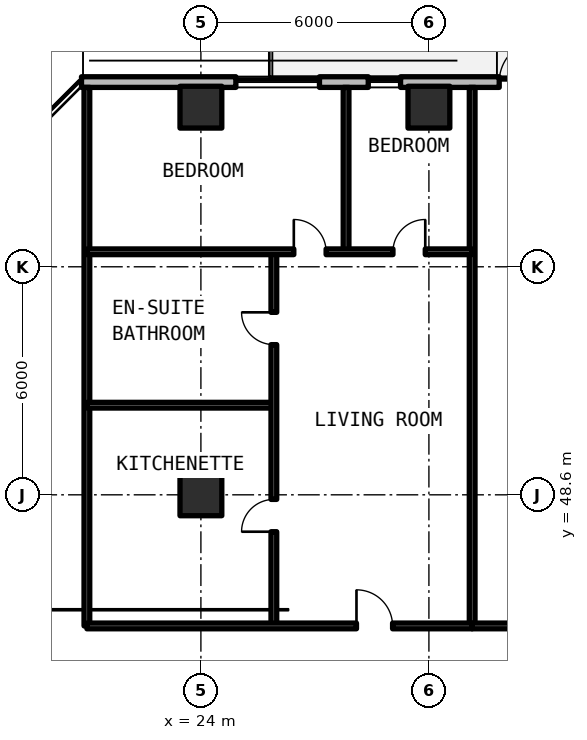
"""IFC4 building model, lengths in metres.
Left out: names, types, materials, properties, quantities, classifications, styles, units other than length and angle.
Written with IfcOpenShell. Run it as: python <this file> out.ifc"""

import sys

from ifc_helpers import new_model, si_unit, direction, frame, frame_2d, origin, origin_2d, place, context, subcontext, project, spatial, rectangle, extrude, element, fill, save


model = new_model("IFC4")
c1 = context("Model", 3, precision=1e-05, world=origin(), true_north=direction((0.0, 1.0)))
c2 = subcontext(c1, "Body", "Model", "MODEL_VIEW")
j1 = project(units=[si_unit("LENGTHUNIT", "METRE"), si_unit("PLANEANGLEUNIT", "RADIAN")], contexts=[c1])
p1 = place(None, origin())
s1 = spatial("IfcSite", under=j1, at=p1, CompositionType="ELEMENT")
p2 = place(p1, origin())
s2 = spatial("IfcBuilding", under=s1, at=p2, CompositionType="ELEMENT")
p3 = place(p2, frame((0.0, 0.0, 55.44)))
s3 = spatial("IfcBuildingStorey", under=s2, at=p3, CompositionType="ELEMENT", Elevation=55.44)
for number, where, z_axis, x_axis in (
    (1, (24.0, 48.6, 0.0), (0.0, 0.0, 1.0), (1.0, 0.0, 0.0)),
    (2, (24.0, 58.8, 0.0), (0.0, 0.0, 1.0), (1.0, 0.0, 0.0)),
    (3, (30.0, 58.8, 0.0), (0.0, 0.0, 1.0), (1.0, 0.0, 0.0)),
):
    element("IfcColumn", number, at=place(p3, frame(where, z_axis=z_axis, x_axis=x_axis)), inside=s3, PredefinedType="COLUMN", context=c2, shape_type="SweptSolid", body=[
        extrude(rectangle(XDim=1.1, YDim=1.1, at=origin_2d()), origin(), (0.0, 0.0, 1.0), 3.3),
    ])
p4 = place(p3, frame((43.46, 59.46, 0.0), z_axis=(0.0, 0.0, 1.0), x_axis=(-1.0, 0.0, 0.0)))
e4 = element("IfcWall", 4, at=p4, inside=s3, PredefinedType="SOLIDWALL", context=c2, shape_type="SweptSolid", body=[
    extrude(rectangle(XDim=22.602, YDim=0.28, at=frame_2d((11.301, 0.0))), origin(), (0.0, 0.0, 1.0), 3.08),
])
p5 = place(p4, frame((10.51, 0.0, 0.0)))
e5 = element("IfcOpeningElement", 5, at=p5, cuts=e4, PredefinedType="OPENING", context=c2, shape_type="SweptSolid", body=[
    extrude(rectangle(XDim=1.1, YDim=2.15, at=frame_2d((0.55, 1.075))), frame((0.0, 0.15, 0.0), z_axis=(0.0, -1.0, 0.0), x_axis=(1.0, 0.0, 0.0)), (0.0, 0.0, 1.0), 0.3),
])
p6 = place(p4, frame((16.34, 0.0, 0.78)))
e6 = element("IfcOpeningElement", 6, at=p6, cuts=e4, PredefinedType="OPENING", context=c2, shape_type="SweptSolid", body=[
    extrude(rectangle(XDim=2.2, YDim=1.66, at=frame_2d((1.1, 0.83))), frame((0.0, 0.15, 0.0), z_axis=(0.0, -1.0, 0.0), x_axis=(1.0, 0.0, 0.0)), (0.0, 0.0, 1.0), 0.3),
])
p7 = place(p4, frame((14.206, 0.0, 0.78)))
e7 = element("IfcOpeningElement", 7, at=p7, cuts=e4, PredefinedType="OPENING", context=c2, shape_type="SweptSolid", body=[
    extrude(rectangle(XDim=0.85, YDim=1.65, at=frame_2d((0.425, 0.825))), frame((0.0, 0.15, 0.0), z_axis=(0.0, -1.0, 0.0), x_axis=(1.0, 0.0, 0.0)), (0.0, 0.0, 1.0), 0.3),
])
for number, where, z_axis, x_axis in (
    (8, (21.0, 45.15, 0.0), (0.0, 0.0, 1.0), (0.0, 1.0, 0.0)),
    (9, (31.138, 45.15, 0.0), (0.0, 0.0, 1.0), (0.0, 1.0, 0.0)),
):
    element("IfcWall", number, at=place(p3, frame(where, z_axis=z_axis, x_axis=x_axis)), inside=s3, PredefinedType="SOLIDWALL", context=c2, shape_type="SweptSolid", body=[
        extrude(rectangle(XDim=14.17, YDim=0.15, at=frame_2d((7.085, 0.0))), origin(), (0.0, 0.0, 1.0), 2.35),
    ])
p8 = place(p3, frame((21.0, 50.958, 0.0), z_axis=(0.0, 0.0, 1.0), x_axis=(1.0, 0.0, 0.0)))
e10 = element("IfcWall", 10, at=p8, inside=s3, PredefinedType="PARTITIONING", context=c2, shape_type="SweptSolid", body=[
    extrude(rectangle(XDim=4.92, YDim=0.15, at=frame_2d((2.46, 0.0))), origin(), (0.0, 0.0, 1.0), 2.35),
])
p9 = place(p3, frame((25.92, 45.15, 0.0), z_axis=(0.0, 0.0, 1.0), x_axis=(0.0, 1.0, 0.0)))
e11 = element("IfcWall", 11, at=p9, inside=s3, PredefinedType="PARTITIONING", context=c2, shape_type="SweptSolid", body=[
    extrude(rectangle(XDim=9.844, YDim=0.15, at=frame_2d((4.922, 0.0))), origin(), (0.0, 0.0, 1.0), 2.35),
])
p10 = place(p9, frame((2.479, 0.0, 0.0)))
e12 = element("IfcOpeningElement", 12, at=p10, cuts=e11, PredefinedType="OPENING", context=c2, shape_type="SweptSolid", body=[
    extrude(rectangle(XDim=0.85, YDim=2.1, at=frame_2d((0.425, 1.05))), frame((0.0, 0.085, 0.0), z_axis=(0.0, -1.0, 0.0), x_axis=(1.0, 0.0, 0.0)), (0.0, 0.0, 1.0), 0.17),
])
p11 = place(p9, frame((7.401, 0.0, 0.0)))
e13 = element("IfcOpeningElement", 13, at=p11, cuts=e11, PredefinedType="OPENING", context=c2, shape_type="SweptSolid", body=[
    extrude(rectangle(XDim=0.85, YDim=2.1, at=frame_2d((0.425, 1.05))), frame((0.0, 0.085, 0.0), z_axis=(0.0, -1.0, 0.0), x_axis=(1.0, 0.0, 0.0)), (0.0, 0.0, 1.0), 0.17),
])
p12 = place(p3, frame((27.82, 54.994, 0.0), z_axis=(0.0, 0.0, 1.0), x_axis=(0.0, 1.0, 0.0)))
e14 = element("IfcWall", 14, at=p12, inside=s3, PredefinedType="PARTITIONING", context=c2, shape_type="SweptSolid", body=[
    extrude(rectangle(XDim=4.326, YDim=0.15, at=frame_2d((2.163, 0.0))), origin(), (0.0, 0.0, 1.0), 2.35),
])
p13 = place(p3, frame((21.0, 54.994, 0.0), z_axis=(0.0, 0.0, 1.0), x_axis=(1.0, 0.0, 0.0)))
e15 = element("IfcWall", 15, at=p13, inside=s3, PredefinedType="PARTITIONING", context=c2, shape_type="SweptSolid", body=[
    extrude(rectangle(XDim=10.138, YDim=0.15, at=frame_2d((5.069, 0.0))), origin(), (0.0, 0.0, 1.0), 2.35),
])
p14 = place(p13, frame((5.445, 0.0, 0.0)))
e16 = element("IfcOpeningElement", 16, at=p14, cuts=e15, PredefinedType="OPENING", context=c2, shape_type="SweptSolid", body=[
    extrude(rectangle(XDim=0.85, YDim=2.1, at=frame_2d((0.425, 1.05))), frame((0.0, 0.085, 0.0), z_axis=(0.0, -1.0, 0.0), x_axis=(1.0, 0.0, 0.0)), (0.0, 0.0, 1.0), 0.17),
])
p15 = place(p13, frame((8.054, 0.0, 0.0)))
e17 = element("IfcOpeningElement", 17, at=p15, cuts=e15, PredefinedType="OPENING", context=c2, shape_type="SweptSolid", body=[
    extrude(rectangle(XDim=0.85, YDim=2.1, at=frame_2d((0.425, 1.05))), frame((0.0, 0.085, 0.0), z_axis=(0.0, -1.0, 0.0), x_axis=(1.0, 0.0, 0.0)), (0.0, 0.0, 1.0), 0.17),
])
p16 = place(p3, frame((21.0, 45.15, 0.0), z_axis=(0.0, 0.0, 1.0), x_axis=(1.0, 0.0, 0.0)))
e18 = element("IfcWall", 18, at=p16, inside=s3, PredefinedType="SOLIDWALL", context=c2, shape_type="SweptSolid", body=[
    extrude(rectangle(XDim=10.138, YDim=0.15, at=frame_2d((5.069, 0.0))), origin(), (0.0, 0.0, 1.0), 2.35),
])
p17 = place(p16, frame((7.094, 0.0, 0.0)))
e19 = element("IfcOpeningElement", 19, at=p17, cuts=e18, PredefinedType="OPENING", context=c2, shape_type="SweptSolid", body=[
    extrude(rectangle(XDim=0.95, YDim=2.15, at=frame_2d((0.475, 1.075))), frame((0.0, 0.085, 0.0), z_axis=(0.0, -1.0, 0.0), x_axis=(1.0, 0.0, 0.0)), (0.0, 0.0, 1.0), 0.17),
])
p18 = place(p3, frame((31.138, 45.15, 0.0), z_axis=(0.0, 0.0, 1.0), x_axis=(1.0, 0.0, 0.0)))
e20 = element("IfcWall", 20, at=p18, inside=s3, PredefinedType="SOLIDWALL", context=c2, shape_type="SweptSolid", body=[
    extrude(rectangle(XDim=12.342, YDim=0.15, at=frame_2d((6.171, 0.0))), origin(), (0.0, 0.0, 1.0), 2.35),
])
p19 = place(p18, frame((5.621, 0.0, 0.0)))
e21 = element("IfcOpeningElement", 21, at=p19, cuts=e20, PredefinedType="OPENING", context=c2, shape_type="SweptSolid", body=[
    extrude(rectangle(XDim=1.1, YDim=2.15, at=frame_2d((0.55, 1.075))), frame((0.0, 0.085, 0.0), z_axis=(0.0, -1.0, 0.0), x_axis=(1.0, 0.0, 0.0)), (0.0, 0.0, 1.0), 0.17),
])
p20 = place(p5, frame((1.1, 0.0, 0.0), z_axis=(0.0, 0.0, 1.0), x_axis=(-1.0, 0.0, 0.0)))
e22 = element("IfcDoor", 22, at=p20, inside=s3, OperationType="SINGLE_SWING_LEFT", PredefinedType="DOOR", context=c2, shape_type="SweptSolid", body=[
    extrude(rectangle(XDim=1.1, YDim=2.15, at=frame_2d((0.55, 1.075))), frame((0.0, 0.025, 0.0), z_axis=(0.0, -1.0, 0.0), x_axis=(1.0, 0.0, 0.0)), (0.0, 0.0, 1.0), 0.05),
])
fill(e5, e22)
p21 = place(p6, origin())
e23 = element("IfcWindow", 23, at=p21, inside=s3, PartitioningType="SINGLE_PANEL", PredefinedType="WINDOW", context=c2, shape_type="SweptSolid", body=[
    extrude(rectangle(XDim=2.2, YDim=1.66, at=frame_2d((1.1, 0.83))), frame((0.0, 0.03, 0.0), z_axis=(0.0, -1.0, 0.0), x_axis=(1.0, 0.0, 0.0)), (0.0, 0.0, 1.0), 0.06),
])
fill(e6, e23)
p22 = place(p7, origin())
e24 = element("IfcWindow", 24, at=p22, inside=s3, PartitioningType="SINGLE_PANEL", PredefinedType="WINDOW", context=c2, shape_type="SweptSolid", body=[
    extrude(rectangle(XDim=0.85, YDim=1.65, at=frame_2d((0.425, 0.825))), frame((0.0, 0.03, 0.0), z_axis=(0.0, -1.0, 0.0), x_axis=(1.0, 0.0, 0.0)), (0.0, 0.0, 1.0), 0.06),
])
fill(e7, e24)
p23 = place(p10, origin())
e25 = element("IfcDoor", 25, at=p23, inside=s3, OperationType="SINGLE_SWING_LEFT", PredefinedType="DOOR", context=c2, shape_type="SweptSolid", body=[
    extrude(rectangle(XDim=0.85, YDim=2.1, at=frame_2d((0.425, 1.05))), frame((0.0, 0.025, 0.0), z_axis=(0.0, -1.0, 0.0), x_axis=(1.0, 0.0, 0.0)), (0.0, 0.0, 1.0), 0.05),
])
fill(e12, e25)
p24 = place(p11, origin())
e26 = element("IfcDoor", 26, at=p24, inside=s3, OperationType="SINGLE_SWING_RIGHT", PredefinedType="DOOR", context=c2, shape_type="SweptSolid", body=[
    extrude(rectangle(XDim=0.85, YDim=2.1, at=frame_2d((0.425, 1.05))), frame((0.0, 0.025, 0.0), z_axis=(0.0, -1.0, 0.0), x_axis=(1.0, 0.0, 0.0)), (0.0, 0.0, 1.0), 0.05),
])
fill(e13, e26)
p25 = place(p14, origin())
e27 = element("IfcDoor", 27, at=p25, inside=s3, OperationType="SINGLE_SWING_LEFT", PredefinedType="DOOR", context=c2, shape_type="SweptSolid", body=[
    extrude(rectangle(XDim=0.85, YDim=2.1, at=frame_2d((0.425, 1.05))), frame((0.0, 0.025, 0.0), z_axis=(0.0, -1.0, 0.0), x_axis=(1.0, 0.0, 0.0)), (0.0, 0.0, 1.0), 0.05),
])
fill(e16, e27)
p26 = place(p15, origin())
e28 = element("IfcDoor", 28, at=p26, inside=s3, OperationType="SINGLE_SWING_RIGHT", PredefinedType="DOOR", context=c2, shape_type="SweptSolid", body=[
    extrude(rectangle(XDim=0.85, YDim=2.1, at=frame_2d((0.425, 1.05))), frame((0.0, 0.025, 0.0), z_axis=(0.0, -1.0, 0.0), x_axis=(1.0, 0.0, 0.0)), (0.0, 0.0, 1.0), 0.05),
])
fill(e17, e28)
p27 = place(p17, origin())
e29 = element("IfcDoor", 29, at=p27, inside=s3, OperationType="SINGLE_SWING_LEFT", PredefinedType="DOOR", context=c2, shape_type="SweptSolid", body=[
    extrude(rectangle(XDim=0.95, YDim=2.15, at=frame_2d((0.475, 1.075))), frame((0.0, 0.025, 0.0), z_axis=(0.0, -1.0, 0.0), x_axis=(1.0, 0.0, 0.0)), (0.0, 0.0, 1.0), 0.05),
])
fill(e19, e29)
save(model, sys.argv[1])
